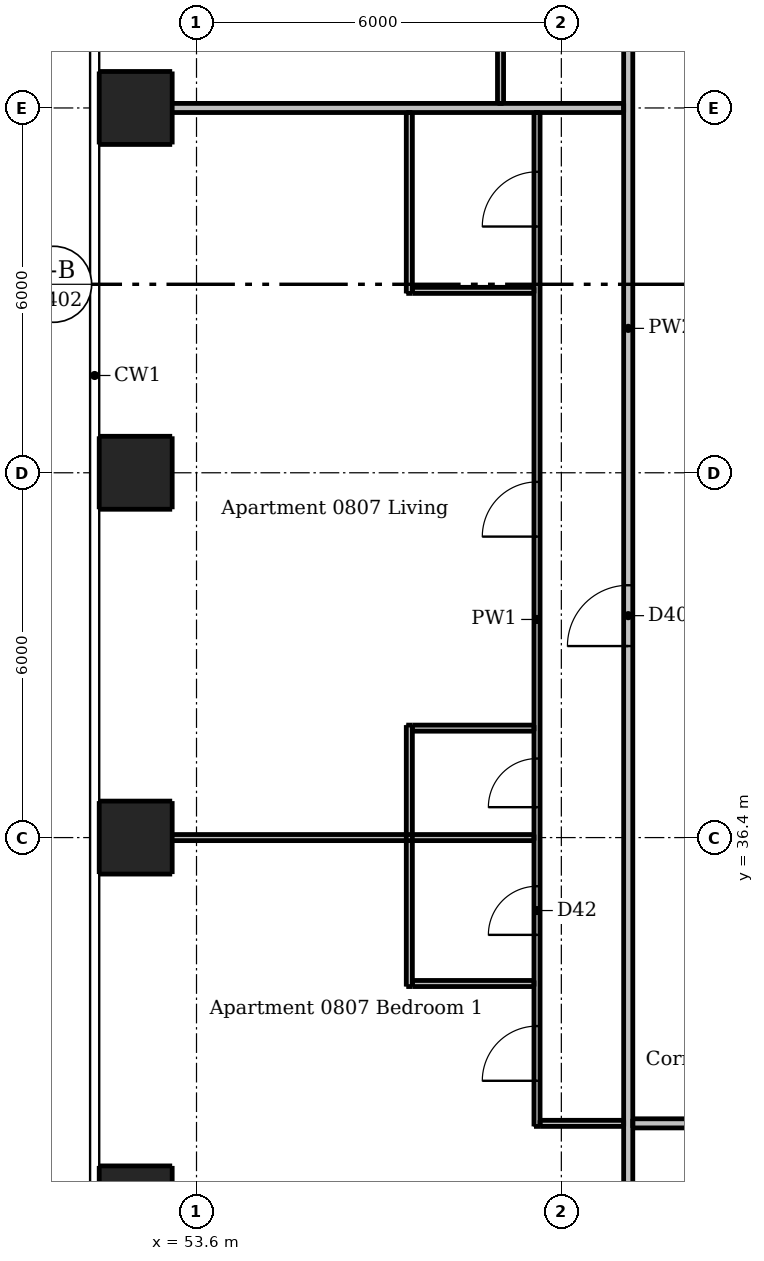
"""IFC4 building model, lengths in metres.
Left out: names, types, materials, properties, quantities, classifications, styles, units other than length and angle.
Written with IfcOpenShell. Run it as: python <this file> out.ifc"""

import sys

from ifc_helpers import new_model, si_unit, direction, frame, frame_2d, origin, origin_2d, place, context, subcontext, project, spatial, rectangle, extrude, element, fill, save


model = new_model("IFC4")
c1 = context("Model", 3, precision=1e-05, world=origin(), true_north=direction((0.0, 1.0)))
c2 = subcontext(c1, "Body", "Model", "MODEL_VIEW")
j1 = project(units=[si_unit("LENGTHUNIT", "METRE"), si_unit("PLANEANGLEUNIT", "RADIAN")], contexts=[c1])
p1 = place(None, origin())
s1 = spatial("IfcSite", under=j1, at=p1, CompositionType="ELEMENT")
p2 = place(p1, origin())
s2 = spatial("IfcBuilding", under=s1, at=p2, CompositionType="ELEMENT")
p3 = place(p2, frame((0.0, 0.0, 33.4)))
s3 = spatial("IfcBuildingStorey", under=s2, at=p3, CompositionType="ELEMENT", Elevation=33.4)
for number, where, z_axis, x_axis in (
    (1, (52.6, 30.4, 0.0), (0.0, 0.0, 1.0), (1.0, 0.0, 0.0)),
    (2, (52.6, 36.4, 0.0), (0.0, 0.0, 1.0), (1.0, 0.0, 0.0)),
    (3, (52.6, 42.4, 0.0), (0.0, 0.0, 1.0), (1.0, 0.0, 0.0)),
    (4, (52.6, 48.4, 0.0), (0.0, 0.0, 1.0), (1.0, 0.0, 0.0)),
):
    element("IfcColumn", number, at=place(p3, frame(where, z_axis=z_axis, x_axis=x_axis)), inside=s3, PredefinedType="COLUMN", context=c2, shape_type="SweptSolid", body=[
        extrude(rectangle(XDim=1.2, YDim=1.2, at=origin_2d()), origin(), (0.0, 0.0, 1.0), 3.05),
    ])
p4 = place(p3, frame((57.1, 33.95, 0.0), z_axis=(0.0, 0.0, 1.0), x_axis=(0.0, 1.0, 0.0)))
e5 = element("IfcWall", 5, at=p4, inside=s3, PredefinedType="PARTITIONING", context=c2, shape_type="SweptSolid", body=[
    extrude(rectangle(XDim=4.3, YDim=0.1, at=frame_2d((2.15, 0.0))), origin(), (0.0, 0.0, 1.0), 3.05),
])
p5 = place(p3, frame((57.1, 45.35, 0.0), z_axis=(0.0, 0.0, 1.0), x_axis=(0.0, 1.0, 0.0)))
e6 = element("IfcWall", 6, at=p5, inside=s3, PredefinedType="PARTITIONING", context=c2, shape_type="SweptSolid", body=[
    extrude(rectangle(XDim=2.975, YDim=0.1, at=frame_2d((1.487, 0.0))), origin(), (0.0, 0.0, 1.0), 3.05),
])
p6 = place(p3, frame((58.6, 54.35, 0.0), z_axis=(0.0, 0.0, 1.0), x_axis=(0.0, -1.0, 0.0)))
e7 = element("IfcWall", 7, at=p6, inside=s3, PredefinedType="PARTITIONING", context=c2, shape_type="SweptSolid", body=[
    extrude(rectangle(XDim=5.875, YDim=0.1, at=frame_2d((2.938, 0.0))), origin(), (0.0, 0.0, 1.0), 3.05),
])
p7 = place(p6, frame((3.75, 0.0, 0.0)))
e8 = element("IfcOpeningElement", 8, at=p7, cuts=e7, PredefinedType="OPENING", context=c2, shape_type="SweptSolid", body=[
    extrude(rectangle(XDim=0.8, YDim=2.1, at=frame_2d((0.4, 1.05))), frame((0.0, 0.06, 0.0), z_axis=(0.0, -1.0, 0.0), x_axis=(1.0, 0.0, 0.0)), (0.0, 0.0, 1.0), 0.12),
])
p8 = place(p3, frame((59.2, 31.65, 0.0), z_axis=(0.0, 0.0, 1.0), x_axis=(0.0, 1.0, 0.0)))
e9 = element("IfcWall", 9, at=p8, inside=s3, PredefinedType="PARTITIONING", context=c2, shape_type="SweptSolid", body=[
    extrude(rectangle(XDim=16.675, YDim=0.1, at=frame_2d((8.337, 0.0))), origin(), (0.0, 0.0, 1.0), 3.05),
])
p9 = place(p8, frame((9.7, 0.0, 0.0)))
e10 = element("IfcOpeningElement", 10, at=p9, cuts=e9, PredefinedType="OPENING", context=c2, shape_type="SweptSolid", body=[
    extrude(rectangle(XDim=0.9, YDim=2.1, at=frame_2d((0.45, 1.05))), frame((0.0, 0.06, 0.0), z_axis=(0.0, -1.0, 0.0), x_axis=(1.0, 0.0, 0.0)), (0.0, 0.0, 1.0), 0.12),
])
p10 = place(p8, frame((14.8, 0.0, 0.0)))
e11 = element("IfcOpeningElement", 11, at=p10, cuts=e9, PredefinedType="OPENING", context=c2, shape_type="SweptSolid", body=[
    extrude(rectangle(XDim=0.9, YDim=2.1, at=frame_2d((0.45, 1.05))), frame((0.0, 0.06, 0.0), z_axis=(0.0, -1.0, 0.0), x_axis=(1.0, 0.0, 0.0)), (0.0, 0.0, 1.0), 0.12),
])
p11 = place(p8, frame((5.25, 0.0, 0.0)))
e12 = element("IfcOpeningElement", 12, at=p11, cuts=e9, PredefinedType="OPENING", context=c2, shape_type="SweptSolid", body=[
    extrude(rectangle(XDim=0.8, YDim=2.1, at=frame_2d((0.4, 1.05))), frame((0.0, 0.06, 0.0), z_axis=(0.0, -1.0, 0.0), x_axis=(1.0, 0.0, 0.0)), (0.0, 0.0, 1.0), 0.12),
])
p12 = place(p8, frame((0.75, 0.0, 0.0)))
e13 = element("IfcOpeningElement", 13, at=p12, cuts=e9, PredefinedType="OPENING", context=c2, shape_type="SweptSolid", body=[
    extrude(rectangle(XDim=0.9, YDim=2.1, at=frame_2d((0.45, 1.05))), frame((0.0, 0.06, 0.0), z_axis=(0.0, -1.0, 0.0), x_axis=(1.0, 0.0, 0.0)), (0.0, 0.0, 1.0), 0.12),
])
p13 = place(p8, frame((3.15, 0.0, 0.0)))
e14 = element("IfcOpeningElement", 14, at=p13, cuts=e9, PredefinedType="OPENING", context=c2, shape_type="SweptSolid", body=[
    extrude(rectangle(XDim=0.8, YDim=2.1, at=frame_2d((0.4, 1.05))), frame((0.0, 0.06, 0.0), z_axis=(0.0, -1.0, 0.0), x_axis=(1.0, 0.0, 0.0)), (0.0, 0.0, 1.0), 0.12),
])
for number, where, z_axis, x_axis in (
    (15, (57.15, 45.4, 0.0), (0.0, 0.0, 1.0), (1.0, 0.0, 0.0)),
    (16, (57.15, 38.2, 0.0), (0.0, 0.0, 1.0), (1.0, 0.0, 0.0)),
):
    element("IfcWall", number, at=place(p3, frame(where, z_axis=z_axis, x_axis=x_axis)), inside=s3, PredefinedType="PARTITIONING", context=c2, shape_type="SweptSolid", body=[
        extrude(rectangle(XDim=2.0, YDim=0.1, at=frame_2d((1.0, 0.0))), origin(), (0.0, 0.0, 1.0), 3.05),
    ])
p14 = place(p3, frame((52.0, 36.4, 0.0), z_axis=(0.0, 0.0, 1.0), x_axis=(1.0, 0.0, 0.0)))
e17 = element("IfcWall", 17, at=p14, inside=s3, PredefinedType="PARTITIONING", context=c2, shape_type="SweptSolid", body=[
    extrude(rectangle(XDim=7.15, YDim=0.1, at=frame_2d((3.575, 0.0))), origin(), (0.0, 0.0, 1.0), 2.516),
])
p15 = place(p3, frame((57.15, 34.0, 0.0), z_axis=(0.0, 0.0, 1.0), x_axis=(1.0, 0.0, 0.0)))
e18 = element("IfcWall", 18, at=p15, inside=s3, PredefinedType="PARTITIONING", context=c2, shape_type="SweptSolid", body=[
    extrude(rectangle(XDim=2.0, YDim=0.1, at=frame_2d((1.0, 0.0))), origin(), (0.0, 0.0, 1.0), 3.05),
])
p16 = place(p3, frame((59.25, 31.7, 0.0), z_axis=(0.0, 0.0, 1.0), x_axis=(1.0, 0.0, 0.0)))
e19 = element("IfcWall", 19, at=p16, inside=s3, PredefinedType="PARTITIONING", context=c2, shape_type="SweptSolid", body=[
    extrude(rectangle(XDim=1.375, YDim=0.1, at=frame_2d((0.688, 0.0))), origin(), (0.0, 0.0, 1.0), 3.05),
])
p17 = place(p3, frame((60.7, 30.325, 0.0), z_axis=(0.0, 0.0, 1.0), x_axis=(0.0, 1.0, 0.0)))
e20 = element("IfcWall", 20, at=p17, inside=s3, PredefinedType="PARTITIONING", context=c2, shape_type="SweptSolid", body=[
    extrude(rectangle(XDim=28.9, YDim=0.15, at=frame_2d((14.45, 0.0))), origin(), (0.0, 0.0, 1.0), 3.05),
])
p18 = place(p17, frame((9.225, 0.0, 0.0)))
e21 = element("IfcOpeningElement", 21, at=p18, cuts=e20, PredefinedType="OPENING", context=c2, shape_type="SweptSolid", body=[
    extrude(rectangle(XDim=1.0, YDim=2.1, at=frame_2d((0.5, 1.05))), frame((0.0, 0.085, 0.0), z_axis=(0.0, -1.0, 0.0), x_axis=(1.0, 0.0, 0.0)), (0.0, 0.0, 1.0), 0.17),
])
p19 = place(p17, frame((26.025, 0.0, 0.0)))
e22 = element("IfcOpeningElement", 22, at=p19, cuts=e20, PredefinedType="OPENING", context=c2, shape_type="SweptSolid", body=[
    extrude(rectangle(XDim=1.0, YDim=2.1, at=frame_2d((0.5, 1.05))), frame((0.0, 0.085, 0.0), z_axis=(0.0, -1.0, 0.0), x_axis=(1.0, 0.0, 0.0)), (0.0, 0.0, 1.0), 0.17),
])
p20 = place(p3, frame((52.0, 48.4, 0.0), z_axis=(0.0, 0.0, 1.0), x_axis=(1.0, 0.0, 0.0)))
e23 = element("IfcWall", 23, at=p20, inside=s3, PredefinedType="PARTITIONING", context=c2, shape_type="SweptSolid", body=[
    extrude(rectangle(XDim=8.625, YDim=0.15, at=frame_2d((4.312, 0.0))), origin(), (0.0, 0.0, 1.0), 2.516),
])
p21 = place(p3, frame((89.525, 31.7, 0.0), z_axis=(0.0, 0.0, 1.0), x_axis=(-1.0, 0.0, 0.0)))
e24 = element("IfcWall", 24, at=p21, inside=s3, PredefinedType="PARTITIONING", context=c2, shape_type="SweptSolid", body=[
    extrude(rectangle(XDim=28.75, YDim=0.15, at=frame_2d((14.375, 0.0))), origin(), (0.0, 0.0, 1.0), 3.05),
])
p22 = place(p21, frame((24.475, 0.0, 0.0)))
e25 = element("IfcOpeningElement", 25, at=p22, cuts=e24, PredefinedType="OPENING", context=c2, shape_type="SweptSolid", body=[
    extrude(rectangle(XDim=1.0, YDim=2.1, at=frame_2d((0.5, 1.05))), frame((0.0, 0.085, 0.0), z_axis=(0.0, -1.0, 0.0), x_axis=(1.0, 0.0, 0.0)), (0.0, 0.0, 1.0), 0.17),
])
p23 = place(p21, frame((7.575, 0.0, 0.0)))
e26 = element("IfcOpeningElement", 26, at=p23, cuts=e24, PredefinedType="OPENING", context=c2, shape_type="SweptSolid", body=[
    extrude(rectangle(XDim=1.0, YDim=2.1, at=frame_2d((0.5, 1.05))), frame((0.0, 0.085, 0.0), z_axis=(0.0, -1.0, 0.0), x_axis=(1.0, 0.0, 0.0)), (0.0, 0.0, 1.0), 0.17),
])
p24 = place(p18, origin())
e27 = element("IfcDoor", 27, at=p24, inside=s3, OperationType="SINGLE_SWING_LEFT", PredefinedType="DOOR", context=c2, shape_type="SweptSolid", body=[
    extrude(rectangle(XDim=1.0, YDim=2.1, at=frame_2d((0.5, 1.05))), frame((0.0, 0.025, 0.0), z_axis=(0.0, -1.0, 0.0), x_axis=(1.0, 0.0, 0.0)), (0.0, 0.0, 1.0), 0.05),
])
fill(e21, e27)
p25 = place(p9, origin())
e28 = element("IfcDoor", 28, at=p25, inside=s3, OperationType="SINGLE_SWING_LEFT", PredefinedType="DOOR", context=c2, shape_type="SweptSolid", body=[
    extrude(rectangle(XDim=0.9, YDim=2.1, at=frame_2d((0.45, 1.05))), frame((0.0, 0.025, 0.0), z_axis=(0.0, -1.0, 0.0), x_axis=(1.0, 0.0, 0.0)), (0.0, 0.0, 1.0), 0.05),
])
fill(e10, e28)
p26 = place(p10, origin())
e29 = element("IfcDoor", 29, at=p26, inside=s3, OperationType="SINGLE_SWING_LEFT", PredefinedType="DOOR", context=c2, shape_type="SweptSolid", body=[
    extrude(rectangle(XDim=0.9, YDim=2.1, at=frame_2d((0.45, 1.05))), frame((0.0, 0.025, 0.0), z_axis=(0.0, -1.0, 0.0), x_axis=(1.0, 0.0, 0.0)), (0.0, 0.0, 1.0), 0.05),
])
fill(e11, e29)
p27 = place(p11, origin())
e30 = element("IfcDoor", 30, at=p27, inside=s3, OperationType="SINGLE_SWING_LEFT", PredefinedType="DOOR", context=c2, shape_type="SweptSolid", body=[
    extrude(rectangle(XDim=0.8, YDim=2.1, at=frame_2d((0.4, 1.05))), frame((0.0, 0.025, 0.0), z_axis=(0.0, -1.0, 0.0), x_axis=(1.0, 0.0, 0.0)), (0.0, 0.0, 1.0), 0.05),
])
fill(e12, e30)
p28 = place(p12, origin())
e31 = element("IfcDoor", 31, at=p28, inside=s3, OperationType="SINGLE_SWING_LEFT", PredefinedType="DOOR", context=c2, shape_type="SweptSolid", body=[
    extrude(rectangle(XDim=0.9, YDim=2.1, at=frame_2d((0.45, 1.05))), frame((0.0, 0.025, 0.0), z_axis=(0.0, -1.0, 0.0), x_axis=(1.0, 0.0, 0.0)), (0.0, 0.0, 1.0), 0.05),
])
fill(e13, e31)
p29 = place(p13, origin())
e32 = element("IfcDoor", 32, at=p29, inside=s3, OperationType="SINGLE_SWING_LEFT", PredefinedType="DOOR", context=c2, shape_type="SweptSolid", body=[
    extrude(rectangle(XDim=0.8, YDim=2.1, at=frame_2d((0.4, 1.05))), frame((0.0, 0.025, 0.0), z_axis=(0.0, -1.0, 0.0), x_axis=(1.0, 0.0, 0.0)), (0.0, 0.0, 1.0), 0.05),
])
fill(e14, e32)
save(model, sys.argv[1])
